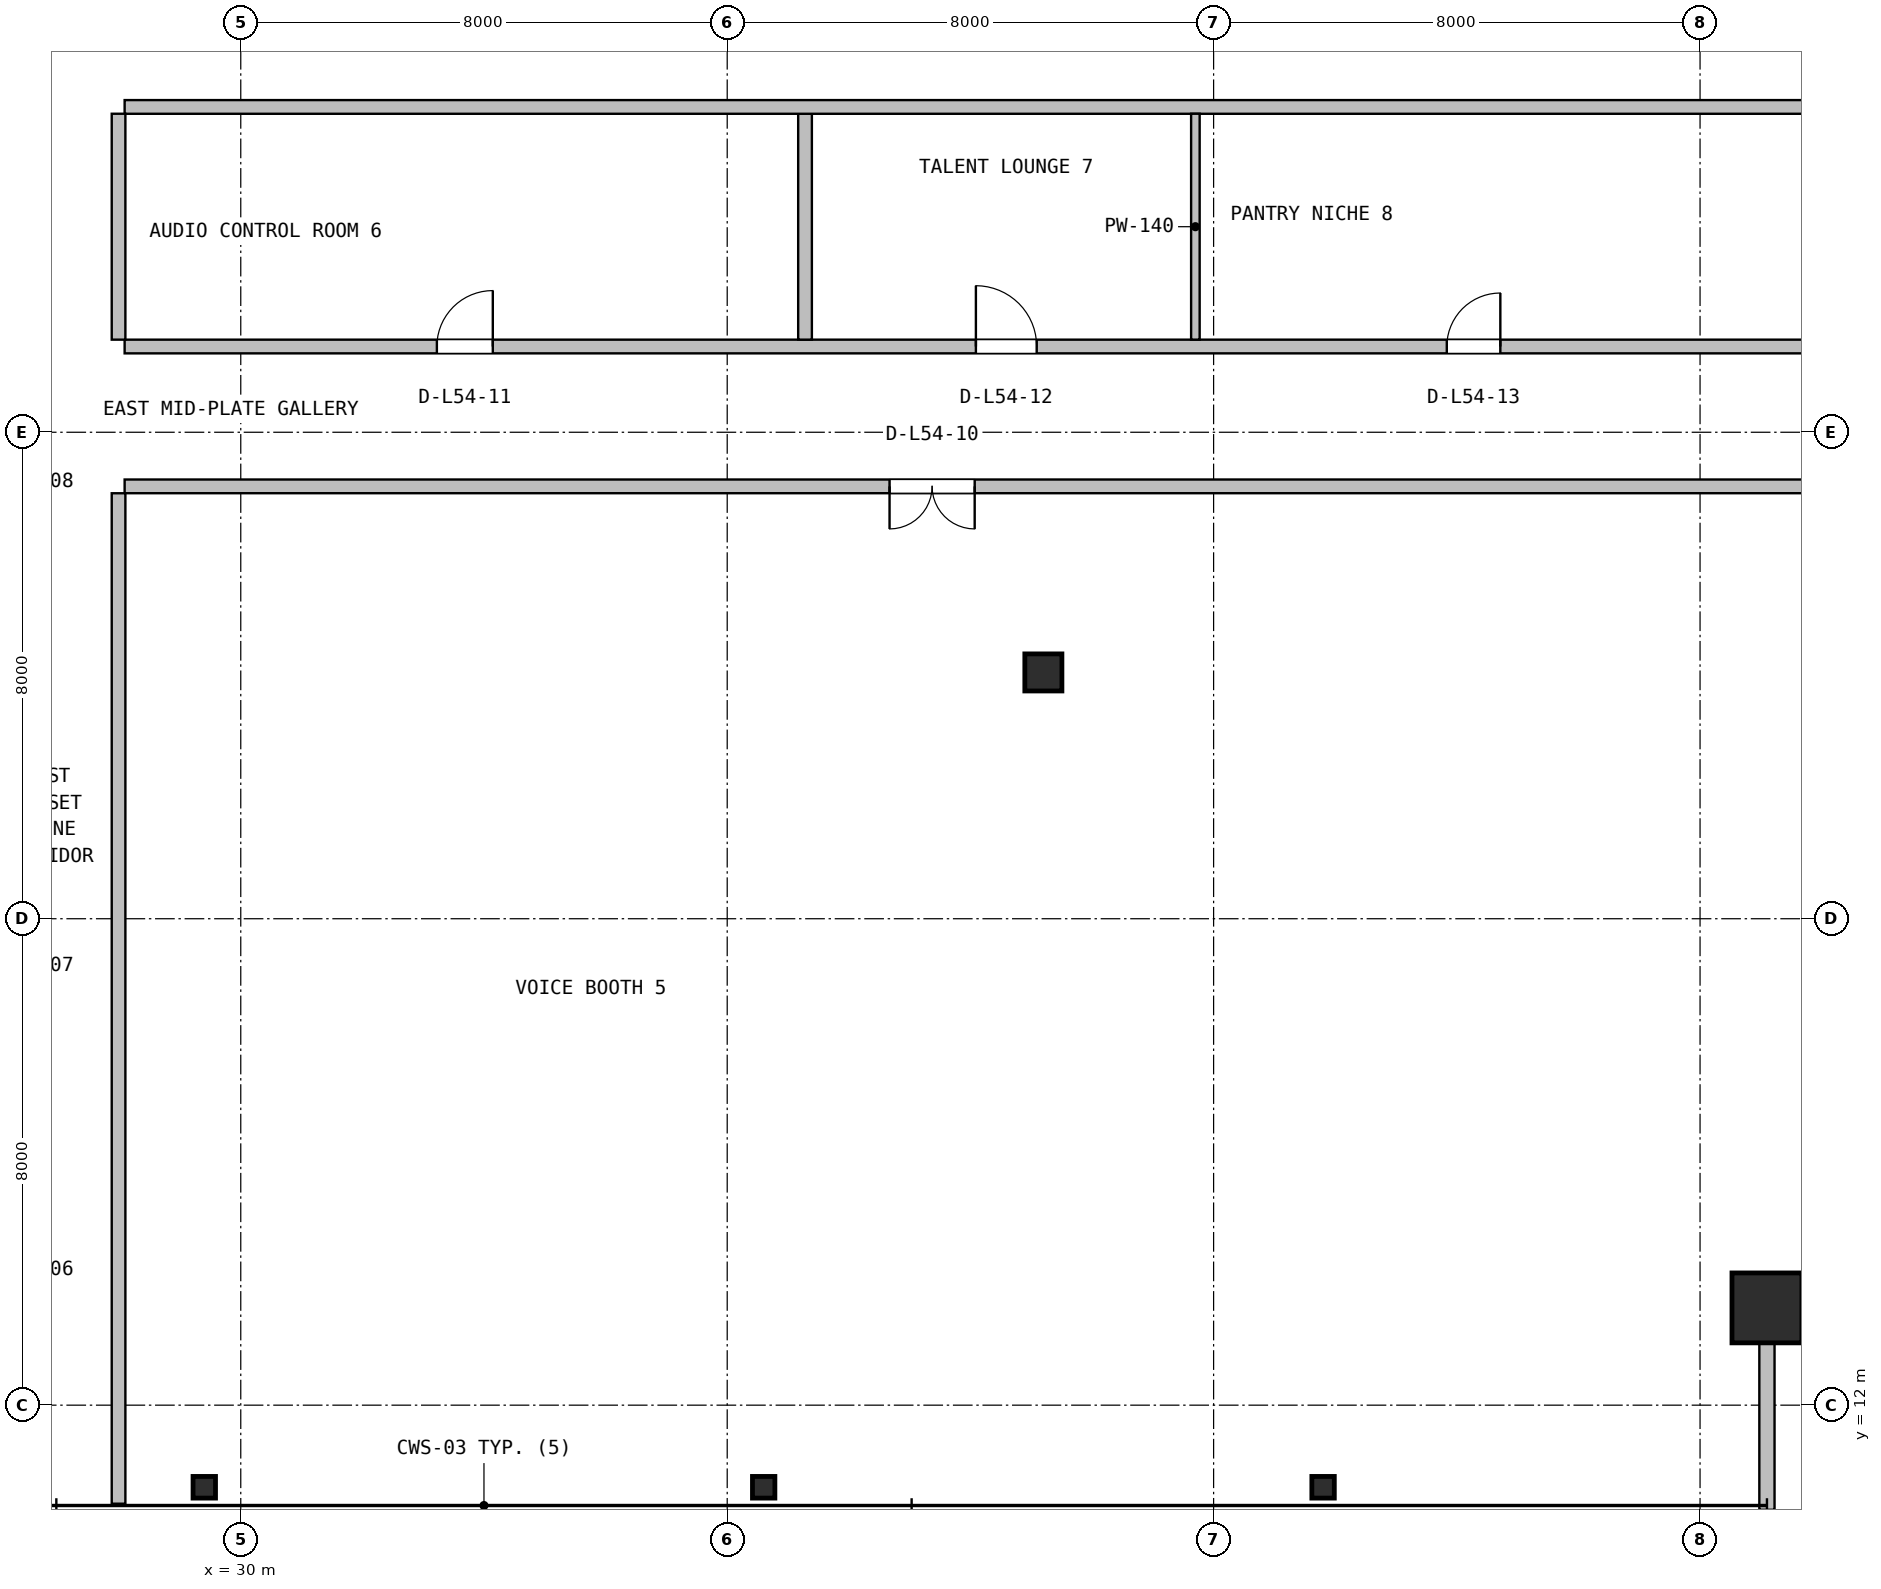
"""IFC4 building model, lengths in metres.
Left out: names, types, materials, properties, quantities, classifications, styles, units other than length and angle.
Written with IfcOpenShell. Run it as: python <this file> out.ifc"""

import sys

from ifc_helpers import new_model, si_unit, direction, frame, frame_2d, origin, origin_2d, place, context, subcontext, project, spatial, rectangle, hollow_rectangle, hollow_circle, i_section, extrude, source, transform, mapped, element, fill, save


model = new_model("IFC4")
c1 = context("Model", 3, precision=1e-05, world=origin(), true_north=direction((0.0, 1.0)))
c2 = subcontext(c1, "Body", "Model", "MODEL_VIEW")
j1 = project(units=[si_unit("LENGTHUNIT", "METRE"), si_unit("PLANEANGLEUNIT", "RADIAN")], contexts=[c1])
p1 = place(None, origin())
s1 = spatial("IfcSite", under=j1, at=p1, CompositionType="ELEMENT")
p2 = place(p1, origin())
s2 = spatial("IfcBuilding", under=s1, at=p2, CompositionType="ELEMENT")
p3 = place(p2, frame((0.0, 0.0, 218.8)))
s3 = spatial("IfcBuildingStorey", under=s2, at=p3, CompositionType="ELEMENT", Elevation=218.8)
m1 = source(origin(), c2, "Body", "SweptSolid", [
    extrude(hollow_rectangle(XDim=1.15, YDim=1.15, WallThickness=0.045, at=origin_2d()), origin(), (0.0, 0.0, 1.0), 3.8),
])
p4 = place(p3, frame((55.1, 13.6, 0.0), z_axis=(0.0, 0.0, 1.0), x_axis=(1.0, 0.0, 0.0)))
e1 = element("IfcColumn", 1, at=p4, inside=s3, PredefinedType="COLUMN", context=c2, shape_type="MappedRepresentation", body=[
    mapped(m1, transform((0.0, 0.0, 0.0), x_axis=(1.0, 0.0, 0.0), y_axis=(0.0, 1.0, 0.0), z_axis=(0.0, 0.0, 1.0), scale=1.0)),
])
m2 = source(origin(), c2, "Body", "SweptSolid", [
    extrude(i_section(OverallWidth=0.369, OverallDepth=0.356, WebThickness=0.011, FlangeThickness=0.018, FilletRadius=0.016, at=origin_2d()), origin(), (0.0, 0.0, 1.0), 3.8),
])
for number, where, z_axis, x_axis in (
    (2, (29.4, 10.65, 0.0), (0.0, 0.0, 1.0), (1.0, 0.0, 0.0)),
    (3, (38.6, 10.65, 0.0), (0.0, 0.0, 1.0), (1.0, 0.0, 0.0)),
    (4, (47.8, 10.65, 0.0), (0.0, 0.0, 1.0), (1.0, 0.0, 0.0)),
):
    element("IfcColumn", number, at=place(p3, frame(where, z_axis=z_axis, x_axis=x_axis)), inside=s3, PredefinedType="COLUMN", context=c2, shape_type="MappedRepresentation", body=[
        mapped(m2, transform((0.0, 0.0, 0.0), x_axis=(1.0, 0.0, 0.0), y_axis=(0.0, 1.0, 0.0), z_axis=(0.0, 0.0, 1.0), scale=1.0)),
    ])
m3 = source(origin(), c2, "Body", "SweptSolid", [
    extrude(hollow_circle(Radius=0.305, WallThickness=0.025, at=origin_2d()), origin(), (0.0, 0.0, 1.0), 3.8),
])
p5 = place(p3, frame((43.2, 24.05, 0.0), z_axis=(0.0, 0.0, 1.0), x_axis=(1.0, 0.0, 0.0)))
e5 = element("IfcColumn", 5, at=p5, inside=s3, PredefinedType="COLUMN", context=c2, shape_type="MappedRepresentation", body=[
    mapped(m3, transform((0.0, 0.0, 0.0), x_axis=(1.0, 0.0, 0.0), y_axis=(0.0, 1.0, 0.0), z_axis=(0.0, 0.0, 1.0), scale=1.0)),
])
p6 = place(p3, frame((55.1, 10.28, 0.0), z_axis=(0.0, 0.0, 1.0), x_axis=(0.0, 1.0, 0.0)))
e6 = element("IfcWall", 6, at=p6, inside=s3, PredefinedType="SOLIDWALL", context=c2, shape_type="SweptSolid", body=[
    extrude(rectangle(XDim=3.4, YDim=0.25, at=frame_2d((1.7, 0.0))), origin(), (0.0, 0.0, 1.0), 3.171),
])
p7 = place(p3, frame((28.09, 27.11, 0.0), z_axis=(0.0, 0.0, 1.0), x_axis=(1.0, 0.0, 0.0)))
e7 = element("IfcWall", 7, at=p7, inside=s3, PredefinedType="PARTITIONING", context=c2, shape_type="SweptSolid", body=[
    extrude(rectangle(XDim=30.23, YDim=0.225, at=frame_2d((15.115, 0.0))), origin(), (0.0, 0.0, 1.0), 2.908),
])
p8 = place(p7, frame((12.58, 0.0, 0.0)))
e8 = element("IfcOpeningElement", 8, at=p8, cuts=e7, PredefinedType="OPENING", context=c2, shape_type="SweptSolid", body=[
    extrude(rectangle(XDim=1.4, YDim=2.12, at=frame_2d((0.7, 1.06))), frame((0.0, 0.123, 0.0), z_axis=(0.0, -1.0, 0.0), x_axis=(1.0, 0.0, 0.0)), (0.0, 0.0, 1.0), 0.245),
])
p9 = place(p3, frame((27.99, 10.38, 0.0), z_axis=(0.0, 0.0, 1.0), x_axis=(0.0, 1.0, 0.0)))
e9 = element("IfcWall", 9, at=p9, inside=s3, PredefinedType="PARTITIONING", context=c2, shape_type="SweptSolid", body=[
    extrude(rectangle(XDim=16.617, YDim=0.225, at=frame_2d((8.309, 0.0))), origin(), (0.0, 0.0, 1.0), 2.908),
])
p10 = place(p3, frame((28.09, 29.41, 0.0), z_axis=(0.0, 0.0, 1.0), x_axis=(1.0, 0.0, 0.0)))
e10 = element("IfcWall", 10, at=p10, inside=s3, PredefinedType="PARTITIONING", context=c2, shape_type="SweptSolid", body=[
    extrude(rectangle(XDim=30.23, YDim=0.225, at=frame_2d((15.115, 0.0))), origin(), (0.0, 0.0, 1.0), 2.908),
])
p11 = place(p10, frame((5.135, 0.0, 0.0)))
e11 = element("IfcOpeningElement", 11, at=p11, cuts=e10, PredefinedType="OPENING", context=c2, shape_type="SweptSolid", body=[
    extrude(rectangle(XDim=0.92, YDim=2.08, at=frame_2d((0.46, 1.04))), frame((0.0, 0.123, 0.0), z_axis=(0.0, -1.0, 0.0), x_axis=(1.0, 0.0, 0.0)), (0.0, 0.0, 1.0), 0.245),
])
p12 = place(p10, frame((14.0, 0.0, 0.0)))
e12 = element("IfcOpeningElement", 12, at=p12, cuts=e10, PredefinedType="OPENING", context=c2, shape_type="SweptSolid", body=[
    extrude(rectangle(XDim=1.0, YDim=2.1, at=frame_2d((0.5, 1.05))), frame((0.0, 0.123, 0.0), z_axis=(0.0, -1.0, 0.0), x_axis=(1.0, 0.0, 0.0)), (0.0, 0.0, 1.0), 0.245),
])
p13 = place(p10, frame((21.745, 0.0, 0.0)))
e13 = element("IfcOpeningElement", 13, at=p13, cuts=e10, PredefinedType="OPENING", context=c2, shape_type="SweptSolid", body=[
    extrude(rectangle(XDim=0.88, YDim=2.06, at=frame_2d((0.44, 1.03))), frame((0.0, 0.123, 0.0), z_axis=(0.0, -1.0, 0.0), x_axis=(1.0, 0.0, 0.0)), (0.0, 0.0, 1.0), 0.245),
])
p14 = place(p3, frame((39.28, 29.523, 0.0), z_axis=(0.0, 0.0, 1.0), x_axis=(0.0, 1.0, 0.0)))
e14 = element("IfcWall", 14, at=p14, inside=s3, PredefinedType="PARTITIONING", context=c2, shape_type="SweptSolid", body=[
    extrude(rectangle(XDim=3.715, YDim=0.225, at=frame_2d((1.857, 0.0))), origin(), (0.0, 0.0, 1.0), 3.53),
])
p15 = place(p3, frame((28.09, 33.35, 0.0), z_axis=(0.0, 0.0, 1.0), x_axis=(1.0, 0.0, 0.0)))
e15 = element("IfcWall", 15, at=p15, inside=s3, PredefinedType="PARTITIONING", context=c2, shape_type="SweptSolid", body=[
    extrude(rectangle(XDim=30.23, YDim=0.225, at=frame_2d((15.115, 0.0))), origin(), (0.0, 0.0, 1.0), 2.908),
])
p16 = place(p3, frame((27.99, 29.523, 0.0), z_axis=(0.0, 0.0, 1.0), x_axis=(0.0, 1.0, 0.0)))
e16 = element("IfcWall", 16, at=p16, inside=s3, PredefinedType="PARTITIONING", context=c2, shape_type="SweptSolid", body=[
    extrude(rectangle(XDim=3.715, YDim=0.225, at=frame_2d((1.857, 0.0))), origin(), (0.0, 0.0, 1.0), 3.53),
])
p17 = place(p3, frame((45.7, 29.523, 0.0), z_axis=(0.0, 0.0, 1.0), x_axis=(0.0, 1.0, 0.0)))
e17 = element("IfcWall", 17, at=p17, inside=s3, PredefinedType="PARTITIONING", context=c2, shape_type="SweptSolid", body=[
    extrude(rectangle(XDim=3.715, YDim=0.14, at=frame_2d((1.857, 0.0))), origin(), (0.0, 0.0, 1.0), 3.53),
])
m4 = source(origin(), c2, "Body", "SweptSolid", [
    extrude(rectangle(XDim=1.4, YDim=2.12, at=frame_2d((0.7, 1.06))), frame((0.0, 0.025, 0.0), z_axis=(0.0, -1.0, 0.0), x_axis=(1.0, 0.0, 0.0)), (0.0, 0.0, 1.0), 0.05),
])
p18 = place(p8, frame((1.4, 0.0, 0.0), z_axis=(0.0, 0.0, 1.0), x_axis=(-1.0, 0.0, 0.0)))
e18 = element("IfcDoor", 18, at=p18, inside=s3, OperationType="DOUBLE_DOOR_SINGLE_SWING", PredefinedType="DOOR", context=c2, shape_type="MappedRepresentation", body=[
    mapped(m4, transform((0.0, 0.0, 0.0), x_axis=(1.0, 0.0, 0.0), y_axis=(0.0, 1.0, 0.0), z_axis=(0.0, 0.0, 1.0), scale=1.0)),
])
fill(e8, e18)
m5 = source(origin(), c2, "Body", "SweptSolid", [
    extrude(rectangle(XDim=0.92, YDim=2.08, at=frame_2d((0.46, 1.04))), frame((0.0, 0.025, 0.0), z_axis=(0.0, -1.0, 0.0), x_axis=(1.0, 0.0, 0.0)), (0.0, 0.0, 1.0), 0.05),
])
p19 = place(p11, origin())
e19 = element("IfcDoor", 19, at=p19, inside=s3, OperationType="SINGLE_SWING_RIGHT", PredefinedType="DOOR", context=c2, shape_type="MappedRepresentation", body=[
    mapped(m5, transform((0.0, 0.0, 0.0), x_axis=(1.0, 0.0, 0.0), y_axis=(0.0, 1.0, 0.0), z_axis=(0.0, 0.0, 1.0), scale=1.0)),
])
fill(e11, e19)
m6 = source(origin(), c2, "Body", "SweptSolid", [
    extrude(rectangle(XDim=1.0, YDim=2.1, at=frame_2d((0.5, 1.05))), frame((0.0, 0.025, 0.0), z_axis=(0.0, -1.0, 0.0), x_axis=(1.0, 0.0, 0.0)), (0.0, 0.0, 1.0), 0.05),
])
p20 = place(p12, origin())
e20 = element("IfcDoor", 20, at=p20, inside=s3, OperationType="SINGLE_SWING_LEFT", PredefinedType="DOOR", context=c2, shape_type="MappedRepresentation", body=[
    mapped(m6, transform((0.0, 0.0, 0.0), x_axis=(1.0, 0.0, 0.0), y_axis=(0.0, 1.0, 0.0), z_axis=(0.0, 0.0, 1.0), scale=1.0)),
])
fill(e12, e20)
m7 = source(origin(), c2, "Body", "SweptSolid", [
    extrude(rectangle(XDim=0.88, YDim=2.06, at=frame_2d((0.44, 1.03))), frame((0.0, 0.025, 0.0), z_axis=(0.0, -1.0, 0.0), x_axis=(1.0, 0.0, 0.0)), (0.0, 0.0, 1.0), 0.05),
])
p21 = place(p13, origin())
e21 = element("IfcDoor", 21, at=p21, inside=s3, OperationType="SINGLE_SWING_RIGHT", PredefinedType="DOOR", context=c2, shape_type="MappedRepresentation", body=[
    mapped(m7, transform((0.0, 0.0, 0.0), x_axis=(1.0, 0.0, 0.0), y_axis=(0.0, 1.0, 0.0), z_axis=(0.0, 0.0, 1.0), scale=1.0)),
])
fill(e13, e21)
save(model, sys.argv[1])
